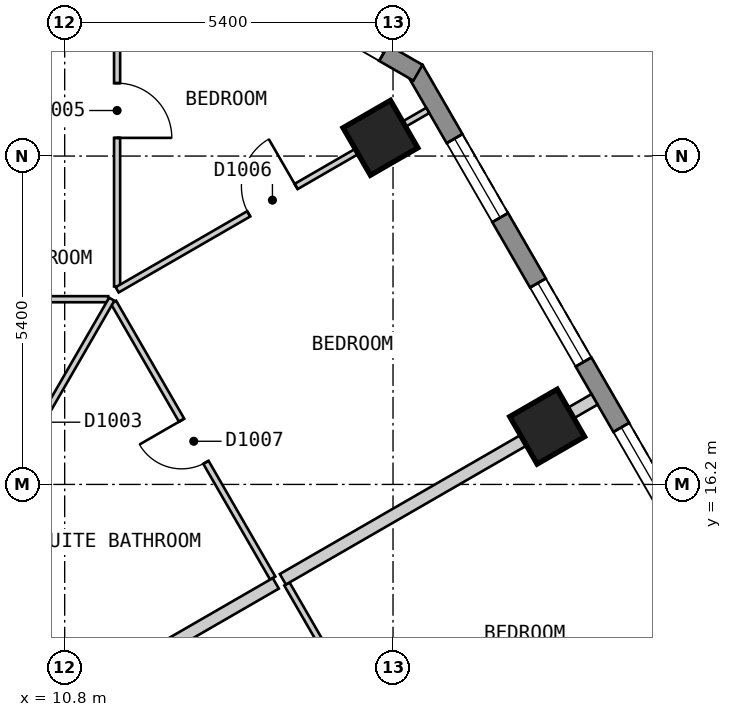
"""IFC4 building model, lengths in metres.
Left out: names, types, materials, properties, quantities, classifications, styles, units other than length and angle.
Written with IfcOpenShell. Run it as: python <this file> out.ifc"""

import sys

from ifc_helpers import new_model, si_unit, direction, frame, frame_2d, origin, origin_2d, place, context, subcontext, project, spatial, polyline, rectangle, outline, extrude, element, fill, save


model = new_model("IFC4")
c1 = context("Model", 3, precision=1e-05, world=origin(), true_north=direction((0.0, 1.0)))
c2 = subcontext(c1, "Body", "Model", "MODEL_VIEW")
j1 = project(units=[si_unit("LENGTHUNIT", "METRE"), si_unit("PLANEANGLEUNIT", "RADIAN")], contexts=[c1])
p1 = place(None, origin())
s1 = spatial("IfcSite", under=j1, at=p1, CompositionType="ELEMENT")
p2 = place(p1, origin())
s2 = spatial("IfcBuilding", under=s1, at=p2, CompositionType="ELEMENT")
p3 = place(p2, frame((0.0, 0.0, 120.6)))
s3 = spatial("IfcBuildingStorey", under=s2, at=p3, CompositionType="ELEMENT", Elevation=120.6)
for number, where, z_axis, x_axis in (
    (1, (18.735, 17.15, 0.0), (0.0, 0.0, 1.0), (-0.5, 0.866, 0.0)),
    (2, (15.993, 21.9, 0.0), (0.0, 0.0, 1.0), (-0.5, 0.866, 0.0)),
):
    element("IfcColumn", number, at=place(p3, frame(where, z_axis=z_axis, x_axis=x_axis)), inside=s3, PredefinedType="COLUMN", context=c2, shape_type="SweptSolid", body=[
        extrude(rectangle(XDim=0.9, YDim=0.9, at=origin_2d()), origin(), (0.0, 0.0, 1.0), 3.0),
    ])
p4 = place(p3, frame((28.218, 2.825, 0.0), z_axis=(0.0, 0.0, 1.0), x_axis=(-0.500020536353, 0.866013546791, 0.0)))
e3 = element("IfcWall", 3, at=p4, inside=s3, PredefinedType="SOLIDWALL", context=c2, shape_type="SweptSolid", body=[
    extrude(outline(polyline([(0.0, -0.15), (23.325, -0.15), (23.245, 0.15), (0.08, 0.15), (0.0, -0.15)])), origin(), (0.0, 0.0, 1.0), 2.7),
])
p5 = place(p4, frame((1.314, 0.0, 0.15)))
e4 = element("IfcOpeningElement", 4, at=p5, cuts=e3, PredefinedType="OPENING", context=c2, shape_type="SweptSolid", body=[
    extrude(rectangle(XDim=1.5, YDim=2.1, at=frame_2d((0.75, 1.05))), frame((0.0, 0.16, 0.0), z_axis=(0.0, -1.0, 0.0), x_axis=(1.0, 0.0, 0.0)), (0.0, 0.0, 1.0), 0.32),
])
p6 = place(p4, frame((4.056, 0.0, 0.15)))
e5 = element("IfcOpeningElement", 5, at=p6, cuts=e3, PredefinedType="OPENING", context=c2, shape_type="SweptSolid", body=[
    extrude(rectangle(XDim=1.5, YDim=2.1, at=frame_2d((0.75, 1.05))), frame((0.0, 0.16, 0.0), z_axis=(0.0, -1.0, 0.0), x_axis=(1.0, 0.0, 0.0)), (0.0, 0.0, 1.0), 0.32),
])
p7 = place(p4, frame((6.798, 0.0, 0.15)))
e6 = element("IfcOpeningElement", 6, at=p7, cuts=e3, PredefinedType="OPENING", context=c2, shape_type="SweptSolid", body=[
    extrude(rectangle(XDim=1.5, YDim=2.1, at=frame_2d((0.75, 1.05))), frame((0.0, 0.16, 0.0), z_axis=(0.0, -1.0, 0.0), x_axis=(1.0, 0.0, 0.0)), (0.0, 0.0, 1.0), 0.32),
])
p8 = place(p4, frame((9.541, 0.0, 0.15)))
e7 = element("IfcOpeningElement", 7, at=p8, cuts=e3, PredefinedType="OPENING", context=c2, shape_type="SweptSolid", body=[
    extrude(rectangle(XDim=1.5, YDim=2.1, at=frame_2d((0.75, 1.05))), frame((0.0, 0.16, 0.0), z_axis=(0.0, -1.0, 0.0), x_axis=(1.0, 0.0, 0.0)), (0.0, 0.0, 1.0), 0.32),
])
p9 = place(p4, frame((12.284, 0.0, 0.15)))
e8 = element("IfcOpeningElement", 8, at=p9, cuts=e3, PredefinedType="OPENING", context=c2, shape_type="SweptSolid", body=[
    extrude(rectangle(XDim=1.5, YDim=2.1, at=frame_2d((0.75, 1.05))), frame((0.0, 0.16, 0.0), z_axis=(0.0, -1.0, 0.0), x_axis=(1.0, 0.0, 0.0)), (0.0, 0.0, 1.0), 0.32),
])
p10 = place(p4, frame((15.027, 0.0, 0.15)))
e9 = element("IfcOpeningElement", 9, at=p10, cuts=e3, PredefinedType="OPENING", context=c2, shape_type="SweptSolid", body=[
    extrude(rectangle(XDim=1.5, YDim=2.1, at=frame_2d((0.75, 1.05))), frame((0.0, 0.16, 0.0), z_axis=(0.0, -1.0, 0.0), x_axis=(1.0, 0.0, 0.0)), (0.0, 0.0, 1.0), 0.32),
])
p11 = place(p4, frame((17.769, 0.0, 0.15)))
e10 = element("IfcOpeningElement", 10, at=p11, cuts=e3, PredefinedType="OPENING", context=c2, shape_type="SweptSolid", body=[
    extrude(rectangle(XDim=1.5, YDim=2.1, at=frame_2d((0.75, 1.05))), frame((0.0, 0.16, 0.0), z_axis=(0.0, -1.0, 0.0), x_axis=(1.0, 0.0, 0.0)), (0.0, 0.0, 1.0), 0.32),
])
p12 = place(p4, frame((20.511, 0.0, 0.15)))
e11 = element("IfcOpeningElement", 11, at=p12, cuts=e3, PredefinedType="OPENING", context=c2, shape_type="SweptSolid", body=[
    extrude(rectangle(XDim=1.5, YDim=2.1, at=frame_2d((0.75, 1.05))), frame((0.0, 0.16, 0.0), z_axis=(0.0, -1.0, 0.0), x_axis=(1.0, 0.0, 0.0)), (0.0, 0.0, 1.0), 0.32),
])
p13 = place(p3, frame((16.61, 22.97, 0.0), z_axis=(0.0, 0.0, 1.0), x_axis=(-0.866022959057, 0.500004234368, 0.0)))
e12 = element("IfcWall", 12, at=p13, inside=s3, PredefinedType="SOLIDWALL", context=c2, shape_type="SweptSolid", body=[
    extrude(outline(polyline([(0.0, -0.15), (5.0, -0.15), (4.92, 0.15), (0.08, 0.15), (0.0, -0.15)])), origin(), (0.0, 0.0, 1.0), 2.7),
])
p14 = place(p13, frame((0.65, 0.0, 0.15)))
e13 = element("IfcOpeningElement", 13, at=p14, cuts=e12, PredefinedType="OPENING", context=c2, shape_type="SweptSolid", body=[
    extrude(rectangle(XDim=1.2, YDim=2.1, at=frame_2d((0.6, 1.05))), frame((0.0, 0.16, 0.0), z_axis=(0.0, -1.0, 0.0), x_axis=(1.0, 0.0, 0.0)), (0.0, 0.0, 1.0), 0.32),
])
p15 = place(p13, frame((3.15, 0.0, 0.15)))
e14 = element("IfcOpeningElement", 14, at=p15, cuts=e12, PredefinedType="OPENING", context=c2, shape_type="SweptSolid", body=[
    extrude(rectangle(XDim=1.2, YDim=2.1, at=frame_2d((0.6, 1.05))), frame((0.0, 0.16, 0.0), z_axis=(0.0, -1.0, 0.0), x_axis=(1.0, 0.0, 0.0)), (0.0, 0.0, 1.0), 0.32),
])
p16 = place(p3, frame((9.296, 15.1, 0.0), z_axis=(0.0, 0.0, 1.0), x_axis=(0.499974024244, -0.866040400375, 0.0)))
e15 = element("IfcWall", 15, at=p16, inside=s3, PredefinedType="PARTITIONING", context=c2, shape_type="SweptSolid", body=[
    extrude(rectangle(XDim=16.857, YDim=0.2, at=frame_2d((8.429, 0.0))), origin(), (0.0, 0.0, 1.0), 2.7),
])
p17 = place(p16, frame((10.672, 0.0, 0.0)))
e16 = element("IfcOpeningElement", 16, at=p17, cuts=e15, PredefinedType="OPENING", context=c2, shape_type="SweptSolid", body=[
    extrude(rectangle(XDim=1.0, YDim=2.1, at=frame_2d((0.5, 1.05))), frame((0.0, 0.11, 0.0), z_axis=(0.0, -1.0, 0.0), x_axis=(1.0, 0.0, 0.0)), (0.0, 0.0, 1.0), 0.22),
])
p18 = place(p3, frame((11.603, 19.196, 0.0), z_axis=(0.0, 0.0, 1.0), x_axis=(0.499913406181, -0.866075392977, 0.0)))
e17 = element("IfcWall", 17, at=p18, inside=s3, PredefinedType="PARTITIONING", context=c2, shape_type="SweptSolid", body=[
    extrude(rectangle(XDim=5.239, YDim=0.1, at=frame_2d((2.619, 0.0))), origin(), (0.0, 0.0, 1.0), 2.7),
])
p19 = place(p18, frame((2.24, 0.0, 0.0)))
e18 = element("IfcOpeningElement", 18, at=p19, cuts=e17, PredefinedType="OPENING", context=c2, shape_type="SweptSolid", body=[
    extrude(rectangle(XDim=0.8, YDim=2.1, at=frame_2d((0.4, 1.05))), frame((0.0, 0.06, 0.0), z_axis=(0.0, -1.0, 0.0), x_axis=(1.0, 0.0, 0.0)), (0.0, 0.0, 1.0), 0.12),
])
p20 = place(p3, frame((14.455, 14.563, 0.0), z_axis=(0.0, 0.0, 1.0), x_axis=(0.500009803579, -0.866019743612, 0.0)))
e19 = element("IfcWall", 19, at=p20, inside=s3, PredefinedType="PARTITIONING", context=c2, shape_type="SweptSolid", body=[
    extrude(rectangle(XDim=16.254, YDim=0.1, at=frame_2d((8.127, 0.0))), origin(), (0.0, 0.0, 1.0), 2.7),
])
p21 = place(p20, frame((7.677, 0.0, 0.0)))
e20 = element("IfcOpeningElement", 20, at=p21, cuts=e19, PredefinedType="OPENING", context=c2, shape_type="SweptSolid", body=[
    extrude(rectangle(XDim=0.9, YDim=2.1, at=frame_2d((0.45, 1.05))), frame((0.0, 0.06, 0.0), z_axis=(0.0, -1.0, 0.0), x_axis=(1.0, 0.0, 0.0)), (0.0, 0.0, 1.0), 0.12),
])
p22 = place(p3, frame((9.033, 19.246, 0.0), z_axis=(0.0, 0.0, 1.0), x_axis=(1.0, 0.0, 0.0)))
e21 = element("IfcWall", 21, at=p22, inside=s3, PredefinedType="PARTITIONING", context=c2, shape_type="SweptSolid", body=[
    extrude(rectangle(XDim=2.483, YDim=0.1, at=frame_2d((1.242, 0.0))), origin(), (0.0, 0.0, 1.0), 2.7),
])
p23 = place(p22, frame((0.117, 0.0, 0.0)))
e22 = element("IfcOpeningElement", 22, at=p23, cuts=e21, PredefinedType="OPENING", context=c2, shape_type="SweptSolid", body=[
    extrude(rectangle(XDim=0.7, YDim=2.1, at=frame_2d((0.35, 1.05))), frame((0.0, 0.06, 0.0), z_axis=(0.0, -1.0, 0.0), x_axis=(1.0, 0.0, 0.0)), (0.0, 0.0, 1.0), 0.12),
])
p24 = place(p3, frame((9.238, 15.2, 0.0), z_axis=(0.0, 0.0, 1.0), x_axis=(0.499983303743, 0.866035043158, 0.0)))
e23 = element("IfcWall", 23, at=p24, inside=s3, PredefinedType="PARTITIONING", context=c2, shape_type="SweptSolid", body=[
    extrude(rectangle(XDim=4.672, YDim=0.1, at=frame_2d((2.336, 0.0))), origin(), (0.0, 0.0, 1.0), 2.7),
])
p25 = place(p3, frame((11.662, 19.456, 0.0), z_axis=(0.0, 0.0, 1.0), x_axis=(0.0, 1.0, 0.0)))
e24 = element("IfcWall", 24, at=p25, inside=s3, PredefinedType="PARTITIONING", context=c2, shape_type="SweptSolid", body=[
    extrude(rectangle(XDim=5.844, YDim=0.1, at=frame_2d((2.922, 0.0))), origin(), (0.0, 0.0, 1.0), 2.7),
])
p26 = place(p25, frame((2.443, 0.0, 0.0)))
e25 = element("IfcOpeningElement", 25, at=p26, cuts=e24, PredefinedType="OPENING", context=c2, shape_type="SweptSolid", body=[
    extrude(rectangle(XDim=0.9, YDim=2.1, at=frame_2d((0.45, 1.05))), frame((0.0, 0.06, 0.0), z_axis=(0.0, -1.0, 0.0), x_axis=(1.0, 0.0, 0.0)), (0.0, 0.0, 1.0), 0.12),
])
p27 = place(p3, frame((11.663, 19.4, 0.0), z_axis=(0.0, 0.0, 1.0), x_axis=(0.865941558533, 0.500145196124, 0.0)))
e26 = element("IfcWall", 26, at=p27, inside=s3, PredefinedType="PARTITIONING", context=c2, shape_type="SweptSolid", body=[
    extrude(rectangle(XDim=5.899, YDim=0.1, at=frame_2d((2.949, 0.0))), origin(), (0.0, 0.0, 1.0), 2.7),
])
p28 = place(p27, frame((2.499, 0.0, 0.0)))
e27 = element("IfcOpeningElement", 27, at=p28, cuts=e26, PredefinedType="OPENING", context=c2, shape_type="SweptSolid", body=[
    extrude(rectangle(XDim=0.9, YDim=2.1, at=frame_2d((0.45, 1.05))), frame((0.0, 0.06, 0.0), z_axis=(0.0, -1.0, 0.0), x_axis=(1.0, 0.0, 0.0)), (0.0, 0.0, 1.0), 0.12),
])
p29 = place(p3, frame((10.854, 12.6, 0.0), z_axis=(0.0, 0.0, 1.0), x_axis=(0.866076396086, 0.499911668341, 0.0)))
e28 = element("IfcWall", 28, at=p29, inside=s3, PredefinedType="PARTITIONING", context=c2, shape_type="SweptSolid", body=[
    extrude(rectangle(XDim=3.947, YDim=0.2, at=frame_2d((1.973, 0.0))), origin(), (0.0, 0.0, 1.0), 2.7),
])
p30 = place(p3, frame((14.388, 14.64, 0.0), z_axis=(0.0, 0.0, 1.0), x_axis=(0.866044090212, 0.499967632761, 0.0)))
e29 = element("IfcWall", 29, at=p30, inside=s3, PredefinedType="PARTITIONING", context=c2, shape_type="SweptSolid", body=[
    extrude(rectangle(XDim=5.919, YDim=0.2, at=frame_2d((2.959, 0.0))), origin(), (0.0, 0.0, 1.0), 2.7),
])
p31 = place(p10, origin())
e30 = element("IfcWindow", 30, at=p31, inside=s3, PartitioningType="SINGLE_PANEL", PredefinedType="WINDOW", context=c2, shape_type="SweptSolid", body=[
    extrude(rectangle(XDim=1.5, YDim=2.1, at=frame_2d((0.75, 1.05))), frame((0.0, 0.03, 0.0), z_axis=(0.0, -1.0, 0.0), x_axis=(1.0, 0.0, 0.0)), (0.0, 0.0, 1.0), 0.06),
])
fill(e9, e30)
p32 = place(p11, origin())
e31 = element("IfcWindow", 31, at=p32, inside=s3, PartitioningType="SINGLE_PANEL", PredefinedType="WINDOW", context=c2, shape_type="SweptSolid", body=[
    extrude(rectangle(XDim=1.5, YDim=2.1, at=frame_2d((0.75, 1.05))), frame((0.0, 0.03, 0.0), z_axis=(0.0, -1.0, 0.0), x_axis=(1.0, 0.0, 0.0)), (0.0, 0.0, 1.0), 0.06),
])
fill(e10, e31)
p33 = place(p12, origin())
e32 = element("IfcWindow", 32, at=p33, inside=s3, PartitioningType="SINGLE_PANEL", PredefinedType="WINDOW", context=c2, shape_type="SweptSolid", body=[
    extrude(rectangle(XDim=1.5, YDim=2.1, at=frame_2d((0.75, 1.05))), frame((0.0, 0.03, 0.0), z_axis=(0.0, -1.0, 0.0), x_axis=(1.0, 0.0, 0.0)), (0.0, 0.0, 1.0), 0.06),
])
fill(e11, e32)
p34 = place(p14, origin())
e33 = element("IfcWindow", 33, at=p34, inside=s3, PartitioningType="SINGLE_PANEL", PredefinedType="WINDOW", context=c2, shape_type="SweptSolid", body=[
    extrude(rectangle(XDim=1.2, YDim=2.1, at=frame_2d((0.6, 1.05))), frame((0.0, 0.03, 0.0), z_axis=(0.0, -1.0, 0.0), x_axis=(1.0, 0.0, 0.0)), (0.0, 0.0, 1.0), 0.06),
])
fill(e13, e33)
p35 = place(p26, origin())
e34 = element("IfcDoor", 34, at=p35, inside=s3, OperationType="SINGLE_SWING_LEFT", PredefinedType="DOOR", context=c2, shape_type="SweptSolid", body=[
    extrude(rectangle(XDim=0.9, YDim=2.1, at=frame_2d((0.45, 1.05))), frame((0.0, 0.025, 0.0), z_axis=(0.0, -1.0, 0.0), x_axis=(1.0, 0.0, 0.0)), (0.0, 0.0, 1.0), 0.05),
])
fill(e25, e34)
p36 = place(p28, origin())
e35 = element("IfcDoor", 35, at=p36, inside=s3, OperationType="SINGLE_SWING_RIGHT", PredefinedType="DOOR", context=c2, shape_type="SweptSolid", body=[
    extrude(rectangle(XDim=0.9, YDim=2.1, at=frame_2d((0.45, 1.05))), frame((0.0, 0.025, 0.0), z_axis=(0.0, -1.0, 0.0), x_axis=(1.0, 0.0, 0.0)), (0.0, 0.0, 1.0), 0.05),
])
fill(e27, e35)
p37 = place(p19, origin())
e36 = element("IfcDoor", 36, at=p37, inside=s3, OperationType="SINGLE_SWING_LEFT", PredefinedType="DOOR", context=c2, shape_type="SweptSolid", body=[
    extrude(rectangle(XDim=0.8, YDim=2.1, at=frame_2d((0.4, 1.05))), frame((0.0, 0.025, 0.0), z_axis=(0.0, -1.0, 0.0), x_axis=(1.0, 0.0, 0.0)), (0.0, 0.0, 1.0), 0.05),
])
fill(e18, e36)
save(model, sys.argv[1])
